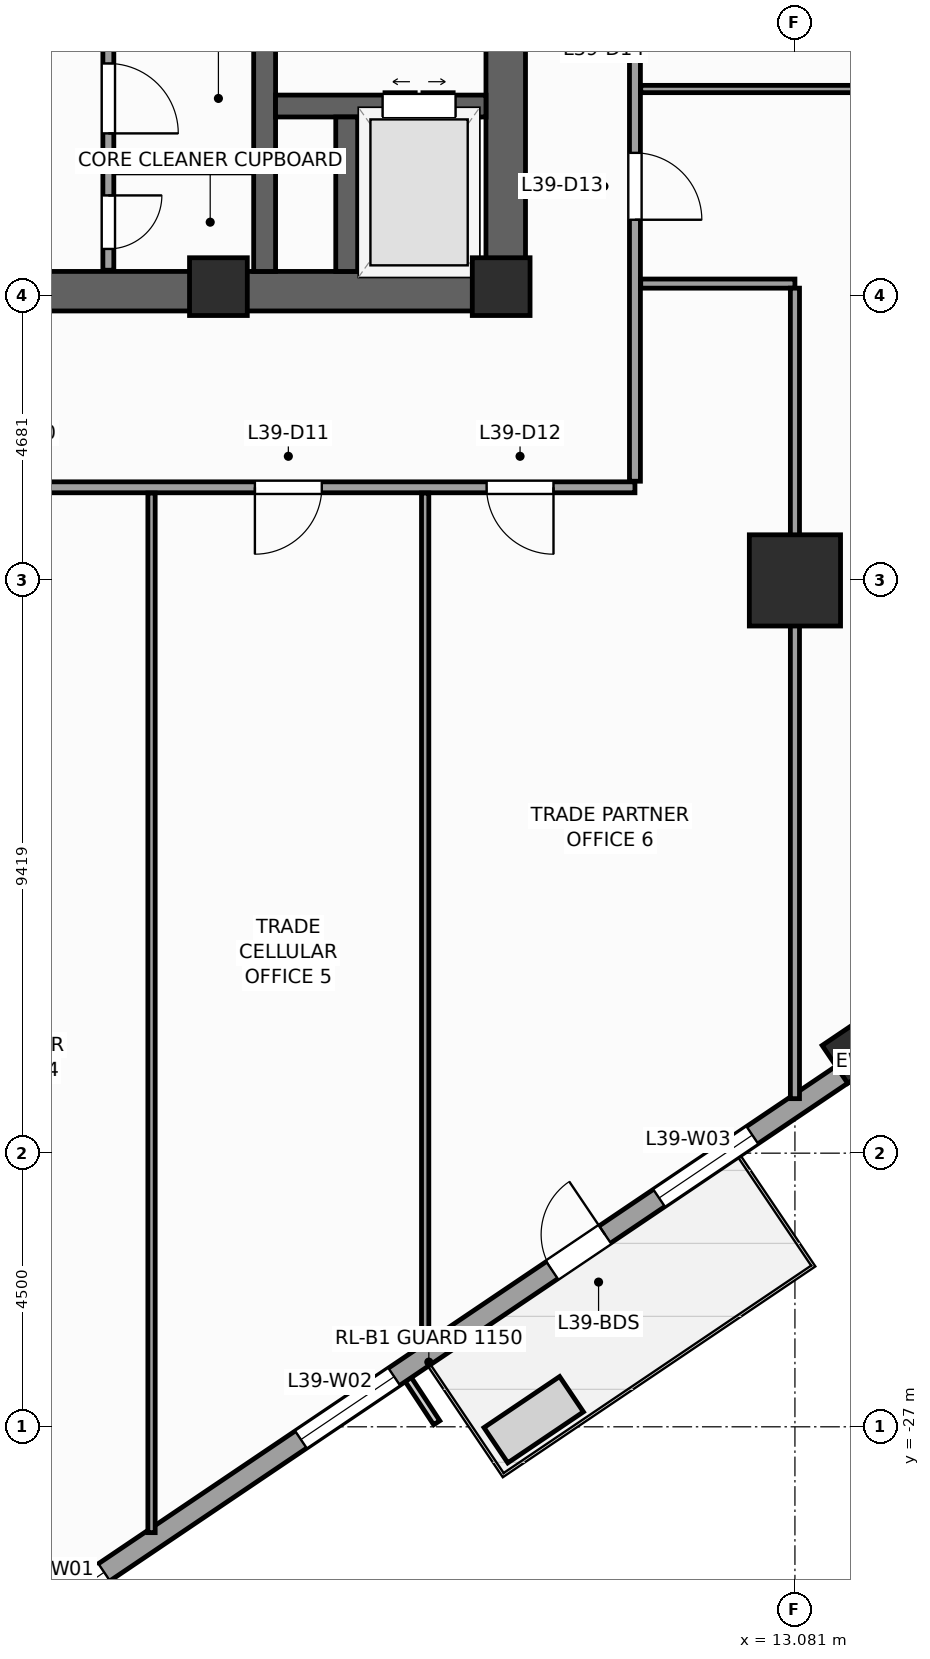
"""IFC4 building model, lengths in metres.
Left out: names, types, materials, properties, quantities, classifications, styles, units other than length and angle.
Written with IfcOpenShell. Run it as: python <this file> out.ifc"""

import sys

from ifc_helpers import new_model, si_unit, direction, frame, frame_2d, origin, origin_2d, place, context, subcontext, project, spatial, rectangle, extrude, source, transform, mapped, element, fill, save


model = new_model("IFC4")
c1 = context("Model", 3, precision=1e-05, world=origin(), true_north=direction((0.0, 1.0)))
c2 = subcontext(c1, "Body", "Model", "MODEL_VIEW")
j1 = project(units=[si_unit("LENGTHUNIT", "METRE"), si_unit("PLANEANGLEUNIT", "RADIAN")], contexts=[c1])
p1 = place(None, origin())
s1 = spatial("IfcSite", under=j1, at=p1, CompositionType="ELEMENT")
p2 = place(p1, origin())
s2 = spatial("IfcBuilding", under=s1, at=p2, CompositionType="ELEMENT")
p3 = place(p2, frame((0.0, 0.0, 164.4)))
s3 = spatial("IfcBuildingStorey", under=s2, at=p3, CompositionType="ELEMENT", Elevation=164.4)
p4 = place(p3, frame((-8.65, -8.325, 0.0), z_axis=(0.0, 0.0, 1.0), x_axis=(1.0, 0.0, 0.0)))
e1 = element("IfcWall", 1, at=p4, inside=s3, PredefinedType="SHEAR", context=c2, shape_type="SweptSolid", body=[
    extrude(rectangle(XDim=17.3, YDim=0.65, at=frame_2d((8.65, 0.0))), origin(), (0.0, 0.0, 1.0), 4.0),
])
p5 = place(p4, frame((8.0, 0.0, 0.0)))
e2 = element("IfcOpeningElement", 2, at=p5, cuts=e1, PredefinedType="OPENING", context=c2, shape_type="SweptSolid", body=[
    extrude(rectangle(XDim=1.3, YDim=2.2, at=frame_2d((0.65, 1.1))), frame((0.0, 0.335, 0.0), z_axis=(0.0, -1.0, 0.0), x_axis=(1.0, 0.0, 0.0)), (0.0, 0.0, 1.0), 0.67),
])
p6 = place(p3, frame((8.325, -8.0, 0.0), z_axis=(0.0, 0.0, 1.0), x_axis=(0.0, 1.0, 0.0)))
e3 = element("IfcWall", 3, at=p6, inside=s3, PredefinedType="SHEAR", context=c2, shape_type="SweptSolid", body=[
    extrude(rectangle(XDim=16.0, YDim=0.65, at=frame_2d((8.0, 0.0))), origin(), (0.0, 0.0, 1.0), 4.0),
])
p7 = place(p6, frame((4.69, 0.0, 0.0)))
e4 = element("IfcOpeningElement", 4, at=p7, cuts=e3, PredefinedType="OPENING", context=c2, shape_type="SweptSolid", body=[
    extrude(rectangle(XDim=1.3, YDim=2.2, at=frame_2d((0.65, 1.1))), frame((0.0, 0.335, 0.0), z_axis=(0.0, -1.0, 0.0), x_axis=(1.0, 0.0, 0.0)), (0.0, 0.0, 1.0), 0.67),
])
p8 = place(p3, frame((4.36, -8.0, 0.0), z_axis=(0.0, 0.0, 1.0), x_axis=(0.0, 1.0, 0.0)))
e5 = element("IfcWall", 5, at=p8, inside=s3, PredefinedType="SHEAR", context=c2, shape_type="SweptSolid", body=[
    extrude(rectangle(XDim=16.0, YDim=0.36, at=frame_2d((8.0, 0.0))), origin(), (0.0, 0.0, 1.0), 4.0),
])
p9 = place(p3, frame((4.54, -5.28, 0.0), z_axis=(0.0, 0.0, 1.0), x_axis=(1.0, 0.0, 0.0)))
e6 = element("IfcWall", 6, at=p9, inside=s3, PredefinedType="SHEAR", context=c2, shape_type="SweptSolid", body=[
    extrude(rectangle(XDim=3.46, YDim=0.36, at=frame_2d((1.73, 0.0))), origin(), (0.0, 0.0, 1.0), 4.0),
])
p10 = place(p9, frame((1.76, 0.0, 0.0)))
e7 = element("IfcOpeningElement", 7, at=p10, cuts=e6, PredefinedType="OPENING", context=c2, shape_type="SweptSolid", body=[
    extrude(rectangle(XDim=1.2, YDim=2.25, at=frame_2d((0.6, 1.125))), frame((0.0, 0.19, 0.0), z_axis=(0.0, -1.0, 0.0), x_axis=(1.0, 0.0, 0.0)), (0.0, 0.0, 1.0), 0.38),
])
p11 = place(p3, frame((5.71, -8.0, 0.0), z_axis=(0.0, 0.0, 1.0), x_axis=(0.0, 1.0, 0.0)))
e8 = element("IfcWall", 8, at=p11, inside=s3, PredefinedType="SHEAR", context=c2, shape_type="SweptSolid", body=[
    extrude(rectangle(XDim=2.54, YDim=0.36, at=frame_2d((1.27, 0.0))), origin(), (0.0, 0.0, 1.0), 4.0),
])
m1 = source(origin(), c2, "Body", "SweptSolid", [
    extrude(rectangle(XDim=0.95, YDim=0.95, at=origin_2d()), origin(), (0.0, 0.0, 1.0), 4.0),
])
for number, where, z_axis, x_axis in (
    (9, (8.25, -8.25, 0.0), (0.0, 0.0, 1.0), (1.0, 0.0, 0.0)),
    (10, (3.6, -8.25, 0.0), (0.0, 0.0, 1.0), (1.0, 0.0, 0.0)),
):
    element("IfcColumn", number, at=place(p3, frame(where, z_axis=z_axis, x_axis=x_axis)), inside=s3, PredefinedType="PILASTER", context=c2, shape_type="MappedRepresentation", body=[
        mapped(m1, transform((0.0, 0.0, 0.0), scale=1.0)),
    ])
m2 = source(origin(), c2, "Body", "SweptSolid", [
    extrude(rectangle(XDim=1.5, YDim=1.5, at=origin_2d()), origin(), (0.0, 0.0, 1.0), 4.0),
])
p12 = place(p3, frame((13.081, -13.081, 0.0), z_axis=(0.0, 0.0, 1.0), x_axis=(1.0, 0.0, 0.0)))
e11 = element("IfcColumn", 11, at=p12, inside=s3, PredefinedType="COLUMN", context=c2, shape_type="MappedRepresentation", body=[
    mapped(m2, transform((0.0, 0.0, 0.0), scale=1.0)),
])
m3 = source(origin(), c2, "Body", "SweptSolid", [
    extrude(rectangle(XDim=0.75, YDim=0.75, at=origin_2d()), origin(), (0.0, 0.0, 1.0), 4.0),
])
p13 = place(p3, frame((14.05, -20.83, 0.0), z_axis=(0.0, 0.0, 1.0), x_axis=(0.829037572555, 0.559192903471, 0.0)))
e12 = element("IfcColumn", 12, at=p13, inside=s3, PredefinedType="COLUMN", context=c2, shape_type="MappedRepresentation", body=[
    mapped(m3, transform((0.0, 0.0, 0.0), scale=1.0)),
])
p14 = place(p3, frame((-2.972, -32.558, 0.0), z_axis=(0.0, 0.0, 1.0), x_axis=(0.829036218961, 0.559194910251, 0.0)))
e13 = element("IfcWall", 13, at=p14, inside=s3, PredefinedType="STANDARD", context=c2, shape_type="SweptSolid", body=[
    extrude(rectangle(XDim=41.34, YDim=0.34, at=frame_2d((20.67, 0.0))), origin(), (0.0, 0.0, 1.0), 3.04),
])
p15 = place(p14, frame((14.545, 0.0, 0.0)))
e14 = element("IfcOpeningElement", 14, at=p15, cuts=e13, PredefinedType="OPENING", context=c2, shape_type="SweptSolid", body=[
    extrude(rectangle(XDim=1.05, YDim=2.25, at=frame_2d((0.525, 1.125))), frame((0.0, 0.18, 0.0), z_axis=(0.0, -1.0, 0.0), x_axis=(1.0, 0.0, 0.0)), (0.0, 0.0, 1.0), 0.36),
])
p16 = place(p14, frame((4.261, 0.0, 0.56)))
e15 = element("IfcOpeningElement", 15, at=p16, cuts=e13, PredefinedType="OPENING", context=c2, shape_type="SweptSolid", body=[
    extrude(rectangle(XDim=1.4, YDim=2.4, at=frame_2d((0.7, 1.2))), frame((0.0, 0.18, 0.0), z_axis=(0.0, -1.0, 0.0), x_axis=(1.0, 0.0, 0.0)), (0.0, 0.0, 1.0), 0.36),
])
p17 = place(p14, frame((9.564, 0.0, 0.61)))
e16 = element("IfcOpeningElement", 16, at=p17, cuts=e13, PredefinedType="OPENING", context=c2, shape_type="SweptSolid", body=[
    extrude(rectangle(XDim=1.85, YDim=2.35, at=frame_2d((0.925, 1.175))), frame((0.0, 0.18, 0.0), z_axis=(0.0, -1.0, 0.0), x_axis=(1.0, 0.0, 0.0)), (0.0, 0.0, 1.0), 0.36),
])
p18 = place(p14, frame((16.668, 0.0, 0.61)))
e17 = element("IfcOpeningElement", 17, at=p18, cuts=e13, PredefinedType="OPENING", context=c2, shape_type="SweptSolid", body=[
    extrude(rectangle(XDim=1.85, YDim=2.35, at=frame_2d((0.925, 1.175))), frame((0.0, 0.18, 0.0), z_axis=(0.0, -1.0, 0.0), x_axis=(1.0, 0.0, 0.0)), (0.0, 0.0, 1.0), 0.36),
])
p19 = place(p14, frame((27.186, 0.0, 0.61)))
e18 = element("IfcOpeningElement", 18, at=p19, cuts=e13, PredefinedType="OPENING", context=c2, shape_type="SweptSolid", body=[
    extrude(rectangle(XDim=1.85, YDim=2.35, at=frame_2d((0.925, 1.175))), frame((0.0, 0.18, 0.0), z_axis=(0.0, -1.0, 0.0), x_axis=(1.0, 0.0, 0.0)), (0.0, 0.0, 1.0), 0.36),
])
p20 = place(p14, frame((34.852, 0.0, 0.56)))
e19 = element("IfcOpeningElement", 19, at=p20, cuts=e13, PredefinedType="OPENING", context=c2, shape_type="SweptSolid", body=[
    extrude(rectangle(XDim=1.4, YDim=2.4, at=frame_2d((0.7, 1.2))), frame((0.0, 0.18, 0.0), z_axis=(0.0, -1.0, 0.0), x_axis=(1.0, 0.0, 0.0)), (0.0, 0.0, 1.0), 0.36),
])
p21 = place(p3, frame((1.79, -7.98, 0.0), z_axis=(0.0, 0.0, 1.0), x_axis=(0.0, 1.0, 0.0)))
e20 = element("IfcWall", 20, at=p21, inside=s3, PredefinedType="PARTITIONING", context=c2, shape_type="SweptSolid", body=[
    extrude(rectangle(XDim=12.38, YDim=0.18, at=frame_2d((6.19, 0.0))), origin(), (0.0, 0.0, 1.0), 3.74),
])
p22 = place(p21, frame((4.6, 0.0, 0.0)))
e21 = element("IfcOpeningElement", 21, at=p22, cuts=e20, PredefinedType="OPENING", context=c2, shape_type="SweptSolid", body=[
    extrude(rectangle(XDim=1.1, YDim=2.2, at=frame_2d((0.55, 1.1))), frame((0.0, 0.1, 0.0), z_axis=(0.0, -1.0, 0.0), x_axis=(1.0, 0.0, 0.0)), (0.0, 0.0, 1.0), 0.2),
])
p23 = place(p21, frame((6.66, 0.0, 0.0)))
e22 = element("IfcOpeningElement", 22, at=p23, cuts=e20, PredefinedType="OPENING", context=c2, shape_type="SweptSolid", body=[
    extrude(rectangle(XDim=1.1, YDim=2.2, at=frame_2d((0.55, 1.1))), frame((0.0, 0.1, 0.0), z_axis=(0.0, -1.0, 0.0), x_axis=(1.0, 0.0, 0.0)), (0.0, 0.0, 1.0), 0.2),
])
p24 = place(p21, frame((0.35, 0.0, 0.0)))
e23 = element("IfcOpeningElement", 23, at=p24, cuts=e20, PredefinedType="OPENING", context=c2, shape_type="SweptSolid", body=[
    extrude(rectangle(XDim=0.88, YDim=2.1, at=frame_2d((0.44, 1.05))), frame((0.0, 0.1, 0.0), z_axis=(0.0, -1.0, 0.0), x_axis=(1.0, 0.0, 0.0)), (0.0, 0.0, 1.0), 0.2),
])
p25 = place(p21, frame((2.25, 0.0, 0.0)))
e24 = element("IfcOpeningElement", 24, at=p25, cuts=e20, PredefinedType="OPENING", context=c2, shape_type="SweptSolid", body=[
    extrude(rectangle(XDim=1.15, YDim=2.25, at=frame_2d((0.575, 1.125))), frame((0.0, 0.1, 0.0), z_axis=(0.0, -1.0, 0.0), x_axis=(1.0, 0.0, 0.0)), (0.0, 0.0, 1.0), 0.2),
])
p26 = place(p3, frame((1.89, -6.3, 0.0), z_axis=(0.0, 0.0, 1.0), x_axis=(1.0, 0.0, 0.0)))
e25 = element("IfcWall", 25, at=p26, inside=s3, PredefinedType="PARTITIONING", context=c2, shape_type="SweptSolid", body=[
    extrude(rectangle(XDim=2.28, YDim=0.16, at=frame_2d((1.14, 0.0))), origin(), (0.0, 0.0, 1.0), 3.74),
])
p27 = place(p3, frame((-11.55, -11.55, 0.0), z_axis=(0.0, 0.0, 1.0), x_axis=(1.0, 0.0, 0.0)))
e26 = element("IfcWall", 26, at=p27, inside=s3, PredefinedType="PARTITIONING", context=c2, shape_type="SweptSolid", body=[
    extrude(rectangle(XDim=22.0, YDim=0.18, at=frame_2d((11.0, 0.0))), origin(), (0.0, 0.0, 1.0), 3.74),
])
p28 = place(p27, frame((1.58, 0.0, 0.0)))
e27 = element("IfcOpeningElement", 27, at=p28, cuts=e26, PredefinedType="OPENING", context=c2, shape_type="SweptSolid", body=[
    extrude(rectangle(XDim=0.95, YDim=2.1, at=frame_2d((0.475, 1.05))), frame((0.0, 0.1, 0.0), z_axis=(0.0, -1.0, 0.0), x_axis=(1.0, 0.0, 0.0)), (0.0, 0.0, 1.0), 0.2),
])
p29 = place(p27, frame((6.75, 0.0, 0.0)))
e28 = element("IfcOpeningElement", 28, at=p29, cuts=e26, PredefinedType="OPENING", context=c2, shape_type="SweptSolid", body=[
    extrude(rectangle(XDim=1.1, YDim=2.2, at=frame_2d((0.55, 1.1))), frame((0.0, 0.1, 0.0), z_axis=(0.0, -1.0, 0.0), x_axis=(1.0, 0.0, 0.0)), (0.0, 0.0, 1.0), 0.2),
])
p30 = place(p27, frame((11.25, 0.0, 0.0)))
e29 = element("IfcOpeningElement", 29, at=p30, cuts=e26, PredefinedType="OPENING", context=c2, shape_type="SweptSolid", body=[
    extrude(rectangle(XDim=1.1, YDim=2.2, at=frame_2d((0.55, 1.1))), frame((0.0, 0.1, 0.0), z_axis=(0.0, -1.0, 0.0), x_axis=(1.0, 0.0, 0.0)), (0.0, 0.0, 1.0), 0.2),
])
p31 = place(p27, frame((15.75, 0.0, 0.0)))
e30 = element("IfcOpeningElement", 30, at=p31, cuts=e26, PredefinedType="OPENING", context=c2, shape_type="SweptSolid", body=[
    extrude(rectangle(XDim=1.1, YDim=2.2, at=frame_2d((0.55, 1.1))), frame((0.0, 0.1, 0.0), z_axis=(0.0, -1.0, 0.0), x_axis=(1.0, 0.0, 0.0)), (0.0, 0.0, 1.0), 0.2),
])
p32 = place(p27, frame((19.561, 0.0, 0.0)))
e31 = element("IfcOpeningElement", 31, at=p32, cuts=e26, PredefinedType="OPENING", context=c2, shape_type="SweptSolid", body=[
    extrude(rectangle(XDim=1.1, YDim=2.2, at=frame_2d((0.55, 1.1))), frame((0.0, 0.1, 0.0), z_axis=(0.0, -1.0, 0.0), x_axis=(1.0, 0.0, 0.0)), (0.0, 0.0, 1.0), 0.2),
])
p33 = place(p3, frame((10.45, -11.45, 0.0), z_axis=(0.0, 0.0, 1.0), x_axis=(0.0, 1.0, 0.0)))
e32 = element("IfcWall", 32, at=p33, inside=s3, PredefinedType="PARTITIONING", context=c2, shape_type="SweptSolid", body=[
    extrude(rectangle(XDim=10.05, YDim=0.18, at=frame_2d((5.025, 0.0))), origin(), (0.0, 0.0, 1.0), 3.74),
])
p34 = place(p33, frame((4.3, 0.0, 0.0)))
e33 = element("IfcOpeningElement", 33, at=p34, cuts=e32, PredefinedType="OPENING", context=c2, shape_type="SweptSolid", body=[
    extrude(rectangle(XDim=1.1, YDim=2.2, at=frame_2d((0.55, 1.1))), frame((0.0, 0.1, 0.0), z_axis=(0.0, -1.0, 0.0), x_axis=(1.0, 0.0, 0.0)), (0.0, 0.0, 1.0), 0.2),
])
p35 = place(p33, frame((7.536, 0.0, 0.0)))
e34 = element("IfcOpeningElement", 34, at=p35, cuts=e32, PredefinedType="OPENING", context=c2, shape_type="SweptSolid", body=[
    extrude(rectangle(XDim=1.1, YDim=2.2, at=frame_2d((0.55, 1.1))), frame((0.0, 0.1, 0.0), z_axis=(0.0, -1.0, 0.0), x_axis=(1.0, 0.0, 0.0)), (0.0, 0.0, 1.0), 0.2),
])
p36 = place(p3, frame((2.5, -28.74, 0.0), z_axis=(0.0, 0.0, 1.0), x_axis=(0.0, 1.0, 0.0)))
e35 = element("IfcWall", 35, at=p36, inside=s3, PredefinedType="PARTITIONING", context=c2, shape_type="SweptSolid", body=[
    extrude(rectangle(XDim=17.095, YDim=0.12, at=frame_2d((8.548, 0.0))), origin(), (0.0, 0.0, 1.0), 3.74),
])
p37 = place(p3, frame((7.0, -25.705, 0.0), z_axis=(0.0, 0.0, 1.0), x_axis=(0.0, 1.0, 0.0)))
e36 = element("IfcWall", 36, at=p37, inside=s3, PredefinedType="PARTITIONING", context=c2, shape_type="SweptSolid", body=[
    extrude(rectangle(XDim=14.06, YDim=0.12, at=frame_2d((7.03, 0.0))), origin(), (0.0, 0.0, 1.0), 3.74),
])
p38 = place(p3, frame((10.545, -8.2, 0.0), z_axis=(0.0, 0.0, 1.0), x_axis=(1.0, 0.0, 0.0)))
e37 = element("IfcWall", 37, at=p38, inside=s3, PredefinedType="PARTITIONING", context=c2, shape_type="SweptSolid", body=[
    extrude(rectangle(XDim=2.536, YDim=0.15, at=frame_2d((1.268, 0.0))), origin(), (0.0, 0.0, 1.0), 3.74),
])
p39 = place(p3, frame((13.081, -8.275, 0.0), z_axis=(0.0, 0.0, 1.0), x_axis=(0.0, -1.0, 0.0)))
e38 = element("IfcWall", 38, at=p39, inside=s3, PredefinedType="PARTITIONING", context=c2, shape_type="SweptSolid", body=[
    extrude(rectangle(XDim=13.329, YDim=0.15, at=frame_2d((6.664, 0.0))), origin(), (0.0, 0.0, 1.0), 2.84),
])
p40 = place(p3, frame((10.545, -5.0, 0.0), z_axis=(0.0, 0.0, 1.0), x_axis=(1.0, 0.0, 0.0)))
e39 = element("IfcWall", 39, at=p40, inside=s3, PredefinedType="PARTITIONING", context=c2, shape_type="SweptSolid", body=[
    extrude(rectangle(XDim=18.21, YDim=0.12, at=frame_2d((9.105, 0.0))), origin(), (0.0, 0.0, 1.0), 3.74),
])
m4 = source(origin(), c2, "Body", "SweptSolid", [
    extrude(rectangle(XDim=1.05, YDim=2.25, at=frame_2d((0.525, 1.125))), frame((0.0, 0.025, 0.0), z_axis=(0.0, -1.0, 0.0), x_axis=(1.0, 0.0, 0.0)), (0.0, 0.0, 1.0), 0.05),
])
p41 = place(p15, origin())
e40 = element("IfcDoor", 40, at=p41, inside=s3, OperationType="SINGLE_SWING_RIGHT", PredefinedType="DOOR", context=c2, shape_type="MappedRepresentation", body=[
    mapped(m4, transform((0.0, 0.0, 0.0), scale=1.0)),
])
fill(e14, e40)
m5 = source(origin(), c2, "Body", "SweptSolid", [
    extrude(rectangle(XDim=1.4, YDim=2.4, at=frame_2d((0.7, 1.2))), frame((0.0, 0.03, 0.0), z_axis=(0.0, -1.0, 0.0), x_axis=(1.0, 0.0, 0.0)), (0.0, 0.0, 1.0), 0.06),
])
p42 = place(p16, origin())
e41 = element("IfcWindow", 41, at=p42, inside=s3, PartitioningType="SINGLE_PANEL", PredefinedType="WINDOW", context=c2, shape_type="MappedRepresentation", body=[
    mapped(m5, transform((0.0, 0.0, 0.0), scale=1.0)),
])
fill(e15, e41)
m6 = source(origin(), c2, "Body", "SweptSolid", [
    extrude(rectangle(XDim=1.85, YDim=2.35, at=frame_2d((0.925, 1.175))), frame((0.0, 0.03, 0.0), z_axis=(0.0, -1.0, 0.0), x_axis=(1.0, 0.0, 0.0)), (0.0, 0.0, 1.0), 0.06),
])
p43 = place(p17, origin())
e42 = element("IfcWindow", 42, at=p43, inside=s3, PartitioningType="SINGLE_PANEL", PredefinedType="WINDOW", context=c2, shape_type="MappedRepresentation", body=[
    mapped(m6, transform((0.0, 0.0, 0.0), scale=1.0)),
])
fill(e16, e42)
p44 = place(p18, origin())
e43 = element("IfcWindow", 43, at=p44, inside=s3, PartitioningType="SINGLE_PANEL", PredefinedType="WINDOW", context=c2, shape_type="MappedRepresentation", body=[
    mapped(m6, transform((0.0, 0.0, 0.0), scale=1.0)),
])
fill(e17, e43)
m7 = source(origin(), c2, "Body", "SweptSolid", [
    extrude(rectangle(XDim=1.2, YDim=2.25, at=frame_2d((0.6, 1.125))), frame((0.0, 0.025, 0.0), z_axis=(0.0, -1.0, 0.0), x_axis=(1.0, 0.0, 0.0)), (0.0, 0.0, 1.0), 0.05),
])
p45 = place(p10, origin())
e44 = element("IfcDoor", 44, at=p45, inside=s3, OperationType="DOUBLE_DOOR_SLIDING", PredefinedType="DOOR", context=c2, shape_type="MappedRepresentation", body=[
    mapped(m7, transform((0.0, 0.0, 0.0), scale=1.0)),
])
fill(e7, e44)
m8 = source(origin(), c2, "Body", "SweptSolid", [
    extrude(rectangle(XDim=0.88, YDim=2.1, at=frame_2d((0.44, 1.05))), frame((0.0, 0.025, 0.0), z_axis=(0.0, -1.0, 0.0), x_axis=(1.0, 0.0, 0.0)), (0.0, 0.0, 1.0), 0.05),
])
p46 = place(p24, frame((0.88, 0.0, 0.0), z_axis=(0.0, 0.0, 1.0), x_axis=(-1.0, 0.0, 0.0)))
e45 = element("IfcDoor", 45, at=p46, inside=s3, OperationType="SINGLE_SWING_RIGHT", PredefinedType="DOOR", context=c2, shape_type="MappedRepresentation", body=[
    mapped(m8, transform((0.0, 0.0, 0.0), scale=1.0)),
])
fill(e23, e45)
m9 = source(origin(), c2, "Body", "SweptSolid", [
    extrude(rectangle(XDim=1.15, YDim=2.25, at=frame_2d((0.575, 1.125))), frame((0.0, 0.025, 0.0), z_axis=(0.0, -1.0, 0.0), x_axis=(1.0, 0.0, 0.0)), (0.0, 0.0, 1.0), 0.05),
])
p47 = place(p25, frame((1.15, 0.0, 0.0), z_axis=(0.0, 0.0, 1.0), x_axis=(-1.0, 0.0, 0.0)))
e46 = element("IfcDoor", 46, at=p47, inside=s3, OperationType="SINGLE_SWING_LEFT", PredefinedType="DOOR", context=c2, shape_type="MappedRepresentation", body=[
    mapped(m9, transform((0.0, 0.0, 0.0), scale=1.0)),
])
fill(e24, e46)
m10 = source(origin(), c2, "Body", "SweptSolid", [
    extrude(rectangle(XDim=1.1, YDim=2.2, at=frame_2d((0.55, 1.1))), frame((0.0, 0.025, 0.0), z_axis=(0.0, -1.0, 0.0), x_axis=(1.0, 0.0, 0.0)), (0.0, 0.0, 1.0), 0.05),
])
p48 = place(p31, frame((1.1, 0.0, 0.0), z_axis=(0.0, 0.0, 1.0), x_axis=(-1.0, 0.0, 0.0)))
e47 = element("IfcDoor", 47, at=p48, inside=s3, OperationType="SINGLE_SWING_LEFT", PredefinedType="DOOR", context=c2, shape_type="MappedRepresentation", body=[
    mapped(m10, transform((0.0, 0.0, 0.0), scale=1.0)),
])
fill(e30, e47)
p49 = place(p32, frame((1.1, 0.0, 0.0), z_axis=(0.0, 0.0, 1.0), x_axis=(-1.0, 0.0, 0.0)))
e48 = element("IfcDoor", 48, at=p49, inside=s3, OperationType="SINGLE_SWING_RIGHT", PredefinedType="DOOR", context=c2, shape_type="MappedRepresentation", body=[
    mapped(m10, transform((0.0, 0.0, 0.0), scale=1.0)),
])
fill(e31, e48)
p50 = place(p34, frame((1.1, 0.0, 0.0), z_axis=(0.0, 0.0, 1.0), x_axis=(-1.0, 0.0, 0.0)))
e49 = element("IfcDoor", 49, at=p50, inside=s3, OperationType="SINGLE_SWING_LEFT", PredefinedType="DOOR", context=c2, shape_type="MappedRepresentation", body=[
    mapped(m10, transform((0.0, 0.0, 0.0), scale=1.0)),
])
fill(e33, e49)
save(model, sys.argv[1])
